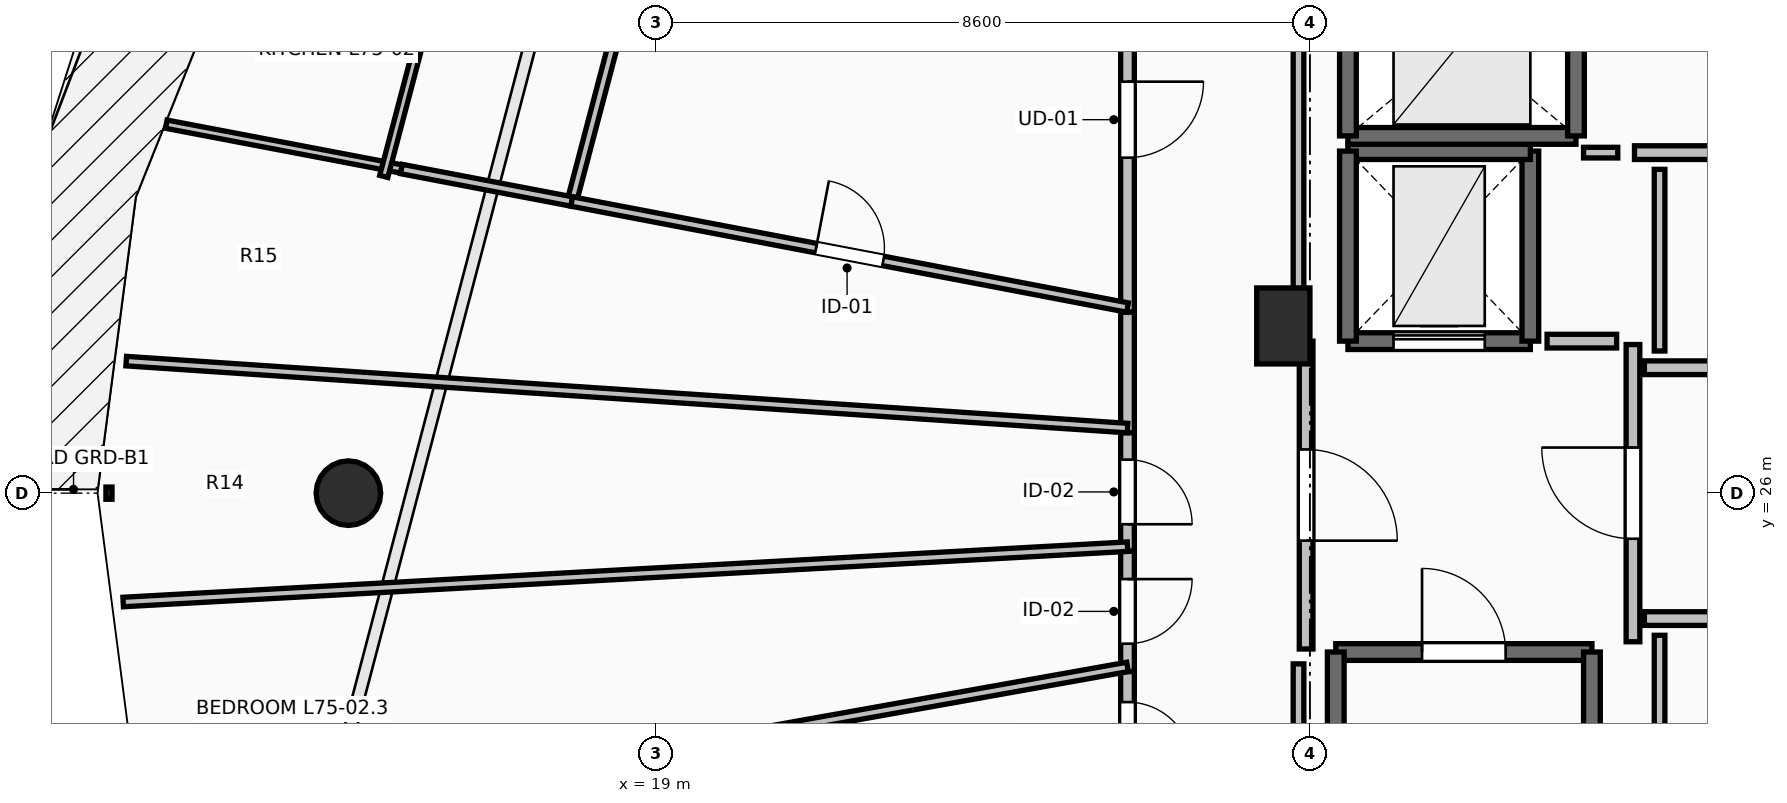
"""IFC4 building model, lengths in metres.
Left out: names, types, materials, properties, quantities, classifications, styles, units other than length and angle.
Written with IfcOpenShell. Run it as: python <this file> out.ifc"""

import sys

from ifc_helpers import new_model, si_unit, direction, frame, frame_2d, origin, origin_2d, place, context, subcontext, project, spatial, rectangle, circle, extrude, element, fill, save


model = new_model("IFC4")
c1 = context("Model", 3, precision=1e-05, world=origin(), true_north=direction((0.0, 1.0)))
c2 = subcontext(c1, "Body", "Model", "MODEL_VIEW")
j1 = project(units=[si_unit("LENGTHUNIT", "METRE"), si_unit("PLANEANGLEUNIT", "RADIAN")], contexts=[c1])
p1 = place(None, origin())
s1 = spatial("IfcSite", under=j1, at=p1, CompositionType="ELEMENT")
p2 = place(p1, origin())
s2 = spatial("IfcBuilding", under=s1, at=p2, CompositionType="ELEMENT")
p3 = place(p2, frame((0.0, 0.0, 276.85)))
s3 = spatial("IfcBuildingStorey", under=s2, at=p3, CompositionType="ELEMENT", Elevation=276.85)
p4 = place(p3, frame((14.95, 26.0, 0.0), z_axis=(0.0, 0.0, 1.0), x_axis=(-1.0, 0.0, 0.0)))
e1 = element("IfcColumn", 1, at=p4, inside=s3, PredefinedType="COLUMN", context=c2, shape_type="SweptSolid", body=[
    extrude(circle(Radius=0.425, at=origin_2d()), origin(), (0.0, 0.0, 1.0), 3.55),
])
p5 = place(p3, frame((27.25, 28.2, 0.0), z_axis=(0.0, 0.0, 1.0), x_axis=(1.0, 0.0, 0.0)))
e2 = element("IfcColumn", 2, at=p5, inside=s3, PredefinedType="PILASTER", context=c2, shape_type="SweptSolid", body=[
    extrude(rectangle(XDim=0.7, YDim=1.0, at=origin_2d()), origin(), (0.0, 0.0, 1.0), 3.55),
])
p6 = place(p3, frame((27.94, 23.91, 0.0), z_axis=(0.0, 0.0, 1.0), x_axis=(1.0, 0.0, 0.0)))
e3 = element("IfcWall", 3, at=p6, inside=s3, PredefinedType="SOLIDWALL", context=c2, shape_type="SweptSolid", body=[
    extrude(rectangle(XDim=3.37, YDim=0.22, at=frame_2d((1.685, 0.0))), origin(), (0.0, 0.0, 1.0), 3.19),
])
p7 = place(p6, frame((1.135, 0.0, 0.0)))
e4 = element("IfcOpeningElement", 4, at=p7, cuts=e3, PredefinedType="OPENING", context=c2, shape_type="SweptSolid", body=[
    extrude(rectangle(XDim=1.1, YDim=2.15, at=frame_2d((0.55, 1.075))), frame((0.0, 0.125, 0.0), z_axis=(0.0, -1.0, 0.0), x_axis=(1.0, 0.0, 0.0)), (0.0, 0.0, 1.0), 0.25),
])
for number, where, z_axis, x_axis in (
    (5, (31.31, 23.91, 0.0), (0.0, 0.0, 1.0), (0.0, -1.0, 0.0)),
    (6, (27.94, 16.49, 0.0), (0.0, 0.0, 1.0), (0.0, 1.0, 0.0)),
):
    element("IfcWall", number, at=place(p3, frame(where, z_axis=z_axis, x_axis=x_axis)), inside=s3, PredefinedType="SOLIDWALL", context=c2, shape_type="SweptSolid", body=[
        extrude(rectangle(XDim=7.42, YDim=0.22, at=frame_2d((3.71, 0.0))), origin(), (0.0, 0.0, 1.0), 3.19),
    ])
p8 = place(p3, frame((28.1, 28.0, 0.0), z_axis=(0.0, 0.0, 1.0), x_axis=(1.0, 0.0, 0.0)))
e7 = element("IfcWall", 7, at=p8, inside=s3, PredefinedType="SHEAR", context=c2, shape_type="SweptSolid", body=[
    extrude(rectangle(XDim=2.4, YDim=0.22, at=frame_2d((1.2, 0.0))), origin(), (0.0, 0.0, 1.0), 3.19),
])
p9 = place(p8, frame((0.6, 0.0, 0.0)))
e8 = element("IfcOpeningElement", 8, at=p9, cuts=e7, PredefinedType="OPENING", context=c2, shape_type="SweptSolid", body=[
    extrude(rectangle(XDim=1.2, YDim=2.2, at=frame_2d((0.6, 1.1))), frame((0.0, 0.125, 0.0), z_axis=(0.0, -1.0, 0.0), x_axis=(1.0, 0.0, 0.0)), (0.0, 0.0, 1.0), 0.25),
])
p10 = place(p3, frame((30.5, 28.0, 0.0), z_axis=(0.0, 0.0, 1.0), x_axis=(0.0, 1.0, 0.0)))
e9 = element("IfcWall", 9, at=p10, inside=s3, PredefinedType="SHEAR", context=c2, shape_type="SweptSolid", body=[
    extrude(rectangle(XDim=2.5, YDim=0.22, at=frame_2d((1.25, 0.0))), origin(), (0.0, 0.0, 1.0), 3.19),
])
p11 = place(p3, frame((30.5, 30.5, 0.0), z_axis=(0.0, 0.0, 1.0), x_axis=(-1.0, 0.0, 0.0)))
e10 = element("IfcWall", 10, at=p11, inside=s3, PredefinedType="SHEAR", context=c2, shape_type="SweptSolid", body=[
    extrude(rectangle(XDim=2.4, YDim=0.22, at=frame_2d((1.2, 0.0))), origin(), (0.0, 0.0, 1.0), 3.19),
])
p12 = place(p3, frame((28.1, 30.5, 0.0), z_axis=(0.0, 0.0, 1.0), x_axis=(0.0, -1.0, 0.0)))
e11 = element("IfcWall", 11, at=p12, inside=s3, PredefinedType="SHEAR", context=c2, shape_type="SweptSolid", body=[
    extrude(rectangle(XDim=2.5, YDim=0.22, at=frame_2d((1.25, 0.0))), origin(), (0.0, 0.0, 1.0), 3.19),
])
p13 = place(p3, frame((28.1, 30.7, 0.0), z_axis=(0.0, 0.0, 1.0), x_axis=(1.0, 0.0, 0.0)))
e12 = element("IfcWall", 12, at=p13, inside=s3, PredefinedType="SOLIDWALL", context=c2, shape_type="SweptSolid", body=[
    extrude(rectangle(XDim=3.0, YDim=0.22, at=frame_2d((1.5, 0.0))), origin(), (0.0, 0.0, 1.0), 3.19),
])
for number, where, z_axis, x_axis in (
    (13, (31.1, 30.7, 0.0), (0.0, 0.0, 1.0), (0.0, 1.0, 0.0)),
    (14, (28.1, 33.2, 0.0), (0.0, 0.0, 1.0), (0.0, -1.0, 0.0)),
):
    element("IfcWall", number, at=place(p3, frame(where, z_axis=z_axis, x_axis=x_axis)), inside=s3, PredefinedType="SOLIDWALL", context=c2, shape_type="SweptSolid", body=[
        extrude(rectangle(XDim=2.5, YDim=0.22, at=frame_2d((1.25, 0.0))), origin(), (0.0, 0.0, 1.0), 3.19),
    ])
p14 = place(p3, frame((31.85, 24.045, 0.0), z_axis=(0.0, 0.0, 1.0), x_axis=(0.0, 1.0, 0.0)))
e15 = element("IfcWall", 15, at=p14, inside=s3, PredefinedType="PARTITIONING", context=c2, shape_type="SweptSolid", body=[
    extrude(rectangle(XDim=3.91, YDim=0.18, at=frame_2d((1.955, 0.0))), origin(), (0.0, 0.0, 1.0), 3.19),
])
p15 = place(p14, frame((1.355, 0.0, 0.0)))
e16 = element("IfcOpeningElement", 16, at=p15, cuts=e15, PredefinedType="OPENING", context=c2, shape_type="SweptSolid", body=[
    extrude(rectangle(XDim=1.2, YDim=2.15, at=frame_2d((0.6, 1.075))), frame((0.0, 0.105, 0.0), z_axis=(0.0, -1.0, 0.0), x_axis=(1.0, 0.0, 0.0)), (0.0, 0.0, 1.0), 0.21),
])
p16 = place(p3, frame((27.55, 28.0, 0.0), z_axis=(0.0, 0.0, 1.0), x_axis=(0.0, -1.0, 0.0)))
e17 = element("IfcWall", 17, at=p16, inside=s3, PredefinedType="PARTITIONING", context=c2, shape_type="SweptSolid", body=[
    extrude(rectangle(XDim=4.05, YDim=0.18, at=frame_2d((2.025, 0.0))), origin(), (0.0, 0.0, 1.0), 3.19),
])
p17 = place(p16, frame((1.425, 0.0, 0.0)))
e18 = element("IfcOpeningElement", 18, at=p17, cuts=e17, PredefinedType="OPENING", context=c2, shape_type="SweptSolid", body=[
    extrude(rectangle(XDim=1.2, YDim=2.15, at=frame_2d((0.6, 1.075))), frame((0.0, 0.105, 0.0), z_axis=(0.0, -1.0, 0.0), x_axis=(1.0, 0.0, 0.0)), (0.0, 0.0, 1.0), 0.21),
])
p18 = place(p3, frame((31.87, 30.48, 0.0), z_axis=(0.0, 0.0, 1.0), x_axis=(1.0, 0.0, 0.0)))
e19 = element("IfcWall", 19, at=p18, inside=s3, PredefinedType="PARTITIONING", context=c2, shape_type="SweptSolid", body=[
    extrude(rectangle(XDim=1.6, YDim=0.18, at=frame_2d((0.8, 0.0))), origin(), (0.0, 0.0, 1.0), 3.19),
])
p19 = place(p3, frame((35.04, 27.65, 0.0), z_axis=(0.0, 0.0, 1.0), x_axis=(-1.0, 0.0, 0.0)))
e20 = element("IfcWall", 20, at=p19, inside=s3, PredefinedType="PARTITIONING", context=c2, shape_type="SweptSolid", body=[
    extrude(rectangle(XDim=3.04, YDim=0.18, at=frame_2d((1.52, 0.0))), origin(), (0.0, 0.0, 1.0), 3.19),
])
p20 = place(p19, frame((1.02, 0.0, 0.0)))
e21 = element("IfcOpeningElement", 21, at=p20, cuts=e20, PredefinedType="OPENING", context=c2, shape_type="SweptSolid", body=[
    extrude(rectangle(XDim=1.0, YDim=2.15, at=frame_2d((0.5, 1.075))), frame((0.0, 0.105, 0.0), z_axis=(0.0, -1.0, 0.0), x_axis=(1.0, 0.0, 0.0)), (0.0, 0.0, 1.0), 0.21),
])
p21 = place(p3, frame((32.0, 24.35, 0.0), z_axis=(0.0, 0.0, 1.0), x_axis=(1.0, 0.0, 0.0)))
e22 = element("IfcWall", 22, at=p21, inside=s3, PredefinedType="PARTITIONING", context=c2, shape_type="SweptSolid", body=[
    extrude(rectangle(XDim=6.645, YDim=0.18, at=frame_2d((3.323, 0.0))), origin(), (0.0, 0.0, 1.0), 3.19),
])
p22 = place(p21, frame((2.897, 0.0, 0.0)))
e23 = element("IfcOpeningElement", 23, at=p22, cuts=e22, PredefinedType="OPENING", context=c2, shape_type="SweptSolid", body=[
    extrude(rectangle(XDim=0.85, YDim=2.1, at=frame_2d((0.425, 1.05))), frame((0.0, 0.105, 0.0), z_axis=(0.0, -1.0, 0.0), x_axis=(1.0, 0.0, 0.0)), (0.0, 0.0, 1.0), 0.21),
])
p23 = place(p3, frame((25.2, 33.445, 0.0), z_axis=(0.0, 0.0, 1.0), x_axis=(0.0, -1.0, 0.0)))
e24 = element("IfcWall", 24, at=p23, inside=s3, PredefinedType="PARTITIONING", context=c2, shape_type="SweptSolid", body=[
    extrude(rectangle(XDim=5.063, YDim=0.18, at=frame_2d((2.531, 0.0))), origin(), (0.0, 0.0, 1.0), 2.382),
])
p24 = place(p23, frame((2.031, 0.0, 0.0)))
e25 = element("IfcOpeningElement", 25, at=p24, cuts=e24, PredefinedType="OPENING", context=c2, shape_type="SweptSolid", body=[
    extrude(rectangle(XDim=1.0, YDim=2.15, at=frame_2d((0.5, 1.075))), frame((0.0, 0.105, 0.0), z_axis=(0.0, -1.0, 0.0), x_axis=(1.0, 0.0, 0.0)), (0.0, 0.0, 1.0), 0.21),
])
p25 = place(p3, frame((25.2, 28.382, 0.0), z_axis=(0.0, 0.0, 1.0), x_axis=(0.0, -1.0, 0.0)))
e26 = element("IfcWall", 26, at=p25, inside=s3, PredefinedType="PARTITIONING", context=c2, shape_type="SweptSolid", body=[
    extrude(rectangle(XDim=1.586, YDim=0.18, at=frame_2d((0.793, 0.0))), origin(), (0.0, 0.0, 1.0), 2.382),
])
p26 = place(p3, frame((25.2, 26.796, 0.0), z_axis=(0.0, 0.0, 1.0), x_axis=(0.0, -1.0, 0.0)))
e27 = element("IfcWall", 27, at=p26, inside=s3, PredefinedType="PARTITIONING", context=c2, shape_type="SweptSolid", body=[
    extrude(rectangle(XDim=1.56, YDim=0.18, at=frame_2d((0.78, 0.0))), origin(), (0.0, 0.0, 1.0), 3.19),
])
p27 = place(p26, frame((0.355, 0.0, 0.0)))
e28 = element("IfcOpeningElement", 28, at=p27, cuts=e27, PredefinedType="OPENING", context=c2, shape_type="SweptSolid", body=[
    extrude(rectangle(XDim=0.85, YDim=2.1, at=frame_2d((0.425, 1.05))), frame((0.0, 0.105, 0.0), z_axis=(0.0, -1.0, 0.0), x_axis=(1.0, 0.0, 0.0)), (0.0, 0.0, 1.0), 0.21),
])
p28 = place(p3, frame((25.2, 25.236, 0.0), z_axis=(0.0, 0.0, 1.0), x_axis=(0.0, -1.0, 0.0)))
e29 = element("IfcWall", 29, at=p28, inside=s3, PredefinedType="PARTITIONING", context=c2, shape_type="SweptSolid", body=[
    extrude(rectangle(XDim=1.583, YDim=0.18, at=frame_2d((0.792, 0.0))), origin(), (0.0, 0.0, 1.0), 3.19),
])
p29 = place(p28, frame((0.366, 0.0, 0.0)))
e30 = element("IfcOpeningElement", 30, at=p29, cuts=e29, PredefinedType="OPENING", context=c2, shape_type="SweptSolid", body=[
    extrude(rectangle(XDim=0.85, YDim=2.1, at=frame_2d((0.425, 1.05))), frame((0.0, 0.105, 0.0), z_axis=(0.0, -1.0, 0.0), x_axis=(1.0, 0.0, 0.0)), (0.0, 0.0, 1.0), 0.21),
])
p30 = place(p3, frame((25.2, 23.653, 0.0), z_axis=(0.0, 0.0, 1.0), x_axis=(0.0, -1.0, 0.0)))
e31 = element("IfcWall", 31, at=p30, inside=s3, PredefinedType="PARTITIONING", context=c2, shape_type="SweptSolid", body=[
    extrude(rectangle(XDim=1.654, YDim=0.18, at=frame_2d((0.827, 0.0))), origin(), (0.0, 0.0, 1.0), 3.19),
])
p31 = place(p30, frame((0.402, 0.0, 0.0)))
e32 = element("IfcOpeningElement", 32, at=p31, cuts=e31, PredefinedType="OPENING", context=c2, shape_type="SweptSolid", body=[
    extrude(rectangle(XDim=0.85, YDim=2.1, at=frame_2d((0.425, 1.05))), frame((0.0, 0.105, 0.0), z_axis=(0.0, -1.0, 0.0), x_axis=(1.0, 0.0, 0.0)), (0.0, 0.0, 1.0), 0.21),
])
p32 = place(p3, frame((15.647, 30.265, 0.0), z_axis=(0.0, 0.0, 1.0), x_axis=(-0.982326348308, 0.187176241599, 0.0)))
e33 = element("IfcWall", 33, at=p32, inside=s3, PredefinedType="PARTITIONING", context=c2, shape_type="SweptSolid", body=[
    extrude(rectangle(XDim=3.149, YDim=0.11, at=frame_2d((1.574, 0.0))), origin(), (0.0, 0.0, 1.0), 3.19),
])
p33 = place(p3, frame((18.488, 32.112, 0.0), z_axis=(0.0, 0.0, 1.0), x_axis=(-0.254651639247, -0.967032854989, 0.0)))
e34 = element("IfcWall", 34, at=p33, inside=s3, PredefinedType="PARTITIONING", context=c2, shape_type="SweptSolid", body=[
    extrude(rectangle(XDim=2.353, YDim=0.125, at=frame_2d((1.176, 0.0))), origin(), (0.0, 0.0, 1.0), 2.382),
])
p34 = place(p3, frame((17.889, 29.837, 0.0), z_axis=(0.0, 0.0, 1.0), x_axis=(-0.982294524987, 0.187343177568, 0.0)))
e35 = element("IfcWall", 35, at=p34, inside=s3, PredefinedType="PARTITIONING", context=c2, shape_type="SweptSolid", body=[
    extrude(rectangle(XDim=2.282, YDim=0.125, at=frame_2d((1.141, 0.0))), origin(), (0.0, 0.0, 1.0), 2.774),
])
p35 = place(p3, frame((17.889, 29.837, 0.0), z_axis=(0.0, 0.0, 1.0), x_axis=(0.982284262094, -0.187396980877, 0.0)))
e36 = element("IfcWall", 36, at=p35, inside=s3, PredefinedType="PARTITIONING", context=c2, shape_type="SweptSolid", body=[
    extrude(rectangle(XDim=7.443, YDim=0.125, at=frame_2d((3.721, 0.0))), origin(), (0.0, 0.0, 1.0), 3.19),
])
p36 = place(p35, frame((3.271, 0.0, 0.0)))
e37 = element("IfcOpeningElement", 37, at=p36, cuts=e36, PredefinedType="OPENING", context=c2, shape_type="SweptSolid", body=[
    extrude(rectangle(XDim=0.9, YDim=2.1, at=frame_2d((0.45, 1.05))), frame((0.0, 0.077, 0.0), z_axis=(0.0, -1.0, 0.0), x_axis=(1.0, 0.0, 0.0)), (0.0, 0.0, 1.0), 0.155),
])
p37 = place(p3, frame((15.415, 30.167, 0.0), z_axis=(0.0, 0.0, 1.0), x_axis=(0.254760975284, 0.967004056596, 0.0)))
e38 = element("IfcWall", 38, at=p37, inside=s3, PredefinedType="PARTITIONING", context=c2, shape_type="SweptSolid", body=[
    extrude(rectangle(XDim=2.918, YDim=0.11, at=frame_2d((1.459, 0.0))), origin(), (0.0, 0.0, 1.0), 3.19),
])
p38 = place(p3, frame((12.027, 27.737, 0.0), z_axis=(0.0, 0.0, 1.0), x_axis=(0.997770487114, -0.066738707243, 0.0)))
e39 = element("IfcWall", 39, at=p38, inside=s3, PredefinedType="PARTITIONING", context=c2, shape_type="SweptSolid", body=[
    extrude(rectangle(XDim=13.202, YDim=0.125, at=frame_2d((6.601, 0.0))), origin(), (0.0, 0.0, 1.0), 2.382),
])
p39 = place(p3, frame((11.987, 24.568, 0.0), z_axis=(0.0, 0.0, 1.0), x_axis=(0.998486468265, 0.054997933516, 0.0)))
e40 = element("IfcWall", 40, at=p39, inside=s3, PredefinedType="PARTITIONING", context=c2, shape_type="SweptSolid", body=[
    extrude(rectangle(XDim=13.233, YDim=0.125, at=frame_2d((6.616, 0.0))), origin(), (0.0, 0.0, 1.0), 2.774),
])
p40 = place(p3, frame((12.577, 21.46, 0.0), z_axis=(0.0, 0.0, 1.0), x_axis=(0.984427104809, 0.175793274383, 0.0)))
e41 = element("IfcWall", 41, at=p40, inside=s3, PredefinedType="PARTITIONING", context=c2, shape_type="SweptSolid", body=[
    extrude(rectangle(XDim=12.823, YDim=0.125, at=frame_2d((6.411, 0.0))), origin(), (0.0, 0.0, 1.0), 2.774),
])
p41 = place(p3, frame((31.635, 28.0, 0.0), z_axis=(0.0, 0.0, 1.0), x_axis=(-1.0, 0.0, 0.0)))
e42 = element("IfcWall", 42, at=p41, inside=s3, PredefinedType="PARTITIONING", context=c2, shape_type="SweptSolid", body=[
    extrude(rectangle(XDim=0.915, YDim=0.18, at=frame_2d((0.458, 0.0))), origin(), (0.0, 0.0, 1.0), 3.19),
])
p42 = place(p3, frame((31.2, 30.48, 0.0), z_axis=(0.0, 0.0, 1.0), x_axis=(1.0, 0.0, 0.0)))
e43 = element("IfcWall", 43, at=p42, inside=s3, PredefinedType="PARTITIONING", context=c2, shape_type="SweptSolid", body=[
    extrude(rectangle(XDim=0.45, YDim=0.14, at=frame_2d((0.225, 0.0))), origin(), (0.0, 0.0, 1.0), 3.19),
])
p43 = place(p3, frame((32.2, 30.26, 0.0), z_axis=(0.0, 0.0, 1.0), x_axis=(0.0, -1.0, 0.0)))
e44 = element("IfcWall", 44, at=p43, inside=s3, PredefinedType="PARTITIONING", context=c2, shape_type="SweptSolid", body=[
    extrude(rectangle(XDim=2.39, YDim=0.14, at=frame_2d((1.195, 0.0))), origin(), (0.0, 0.0, 1.0), 3.19),
])
p44 = place(p3, frame((32.2, 24.13, 0.0), z_axis=(0.0, 0.0, 1.0), x_axis=(0.0, -1.0, 0.0)))
e45 = element("IfcWall", 45, at=p44, inside=s3, PredefinedType="PARTITIONING", context=c2, shape_type="SweptSolid", body=[
    extrude(rectangle(XDim=2.46, YDim=0.14, at=frame_2d((1.23, 0.0))), origin(), (0.0, 0.0, 1.0), 3.19),
])
p45 = place(p3, frame((27.45, 33.45, 0.0), z_axis=(0.0, 0.0, 1.0), x_axis=(0.0, -1.0, 0.0)))
e46 = element("IfcWall", 46, at=p45, inside=s3, PredefinedType="PARTITIONING", context=c2, shape_type="SweptSolid", body=[
    extrude(rectangle(XDim=5.254, YDim=0.14, at=frame_2d((2.627, 0.0))), origin(), (0.0, 0.0, 1.0), 2.382),
])
p46 = place(p3, frame((27.45, 23.754, 0.0), z_axis=(0.0, 0.0, 1.0), x_axis=(0.0, -1.0, 0.0)))
e47 = element("IfcWall", 47, at=p46, inside=s3, PredefinedType="PARTITIONING", context=c2, shape_type="SweptSolid", body=[
    extrude(rectangle(XDim=7.514, YDim=0.14, at=frame_2d((3.757, 0.0))), origin(), (0.0, 0.0, 1.0), 2.382),
])
p47 = place(p7, origin())
e48 = element("IfcDoor", 48, at=p47, inside=s3, OperationType="SINGLE_SWING_LEFT", PredefinedType="DOOR", context=c2, shape_type="SweptSolid", body=[
    extrude(rectangle(XDim=1.1, YDim=2.15, at=frame_2d((0.55, 1.075))), frame((0.0, 0.025, 0.0), z_axis=(0.0, -1.0, 0.0), x_axis=(1.0, 0.0, 0.0)), (0.0, 0.0, 1.0), 0.05),
])
fill(e4, e48)
p48 = place(p9, origin())
e49 = element("IfcDoor", 49, at=p48, inside=s3, OperationType="SLIDING_TO_LEFT", PredefinedType="DOOR", context=c2, shape_type="SweptSolid", body=[
    extrude(rectangle(XDim=1.2, YDim=2.2, at=frame_2d((0.6, 1.1))), frame((0.0, 0.025, 0.0), z_axis=(0.0, -1.0, 0.0), x_axis=(1.0, 0.0, 0.0)), (0.0, 0.0, 1.0), 0.05),
])
fill(e8, e49)
p49 = place(p15, origin())
e50 = element("IfcDoor", 50, at=p49, inside=s3, OperationType="SINGLE_SWING_RIGHT", PredefinedType="DOOR", context=c2, shape_type="SweptSolid", body=[
    extrude(rectangle(XDim=1.2, YDim=2.15, at=frame_2d((0.6, 1.075))), frame((0.0, 0.025, 0.0), z_axis=(0.0, -1.0, 0.0), x_axis=(1.0, 0.0, 0.0)), (0.0, 0.0, 1.0), 0.05),
])
fill(e16, e50)
p50 = place(p17, origin())
e51 = element("IfcDoor", 51, at=p50, inside=s3, OperationType="SINGLE_SWING_RIGHT", PredefinedType="DOOR", context=c2, shape_type="SweptSolid", body=[
    extrude(rectangle(XDim=1.2, YDim=2.15, at=frame_2d((0.6, 1.075))), frame((0.0, 0.025, 0.0), z_axis=(0.0, -1.0, 0.0), x_axis=(1.0, 0.0, 0.0)), (0.0, 0.0, 1.0), 0.05),
])
fill(e18, e51)
p51 = place(p24, origin())
e52 = element("IfcDoor", 52, at=p51, inside=s3, OperationType="SINGLE_SWING_LEFT", PredefinedType="DOOR", context=c2, shape_type="SweptSolid", body=[
    extrude(rectangle(XDim=1.0, YDim=2.15, at=frame_2d((0.5, 1.075))), frame((0.0, 0.025, 0.0), z_axis=(0.0, -1.0, 0.0), x_axis=(1.0, 0.0, 0.0)), (0.0, 0.0, 1.0), 0.05),
])
fill(e25, e52)
p52 = place(p36, origin())
e53 = element("IfcDoor", 53, at=p52, inside=s3, OperationType="SINGLE_SWING_LEFT", PredefinedType="DOOR", context=c2, shape_type="SweptSolid", body=[
    extrude(rectangle(XDim=0.9, YDim=2.1, at=frame_2d((0.45, 1.05))), frame((0.0, 0.025, 0.0), z_axis=(0.0, -1.0, 0.0), x_axis=(1.0, 0.0, 0.0)), (0.0, 0.0, 1.0), 0.05),
])
fill(e37, e53)
p53 = place(p27, origin())
e54 = element("IfcDoor", 54, at=p53, inside=s3, OperationType="SINGLE_SWING_RIGHT", PredefinedType="DOOR", context=c2, shape_type="SweptSolid", body=[
    extrude(rectangle(XDim=0.85, YDim=2.1, at=frame_2d((0.425, 1.05))), frame((0.0, 0.025, 0.0), z_axis=(0.0, -1.0, 0.0), x_axis=(1.0, 0.0, 0.0)), (0.0, 0.0, 1.0), 0.05),
])
fill(e28, e54)
p54 = place(p29, origin())
e55 = element("IfcDoor", 55, at=p54, inside=s3, OperationType="SINGLE_SWING_LEFT", PredefinedType="DOOR", context=c2, shape_type="SweptSolid", body=[
    extrude(rectangle(XDim=0.85, YDim=2.1, at=frame_2d((0.425, 1.05))), frame((0.0, 0.025, 0.0), z_axis=(0.0, -1.0, 0.0), x_axis=(1.0, 0.0, 0.0)), (0.0, 0.0, 1.0), 0.05),
])
fill(e30, e55)
p55 = place(p31, origin())
e56 = element("IfcDoor", 56, at=p55, inside=s3, OperationType="SINGLE_SWING_RIGHT", PredefinedType="DOOR", context=c2, shape_type="SweptSolid", body=[
    extrude(rectangle(XDim=0.85, YDim=2.1, at=frame_2d((0.425, 1.05))), frame((0.0, 0.025, 0.0), z_axis=(0.0, -1.0, 0.0), x_axis=(1.0, 0.0, 0.0)), (0.0, 0.0, 1.0), 0.05),
])
fill(e32, e56)
save(model, sys.argv[1])
